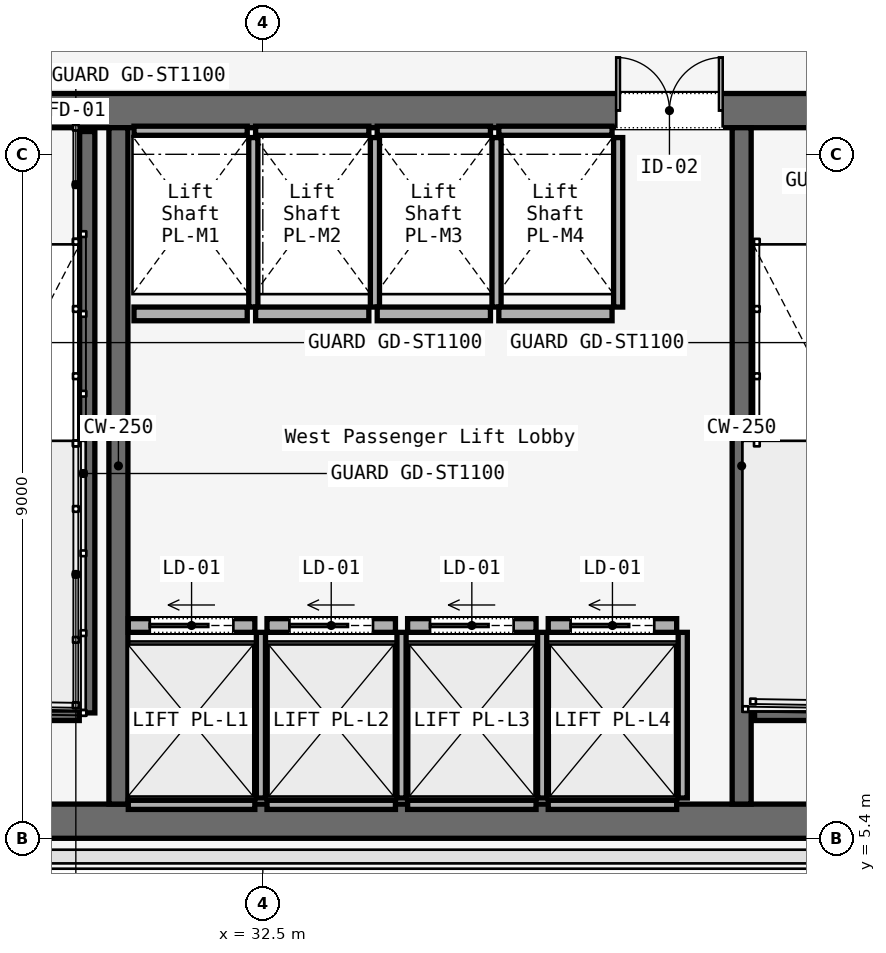
"""IFC4 building model, lengths in metres.
Left out: names, types, materials, properties, quantities, classifications, styles, units other than length and angle.
Written with IfcOpenShell. Run it as: python <this file> out.ifc"""

import sys

from ifc_helpers import new_model, si_unit, direction, frame, frame_2d, origin, place, context, subcontext, project, spatial, rectangle, extrude, element, fill, save


model = new_model("IFC4")
c1 = context("Model", 3, precision=1e-05, world=origin(), true_north=direction((0.0, 1.0)))
c2 = subcontext(c1, "Body", "Model", "MODEL_VIEW")
j1 = project(units=[si_unit("LENGTHUNIT", "METRE"), si_unit("PLANEANGLEUNIT", "RADIAN")], contexts=[c1])
p1 = place(None, origin())
s1 = spatial("IfcSite", under=j1, at=p1, CompositionType="ELEMENT")
p2 = place(p1, origin())
s2 = spatial("IfcBuilding", under=s1, at=p2, CompositionType="ELEMENT")
p3 = place(p2, frame((0.0, 0.0, 55.0)))
s3 = spatial("IfcBuildingStorey", under=s2, at=p3, CompositionType="ELEMENT", Elevation=55.0)
p4 = place(p3, frame((26.45, 14.975, 0.0), z_axis=(0.0, 0.0, 1.0), x_axis=(1.0, 0.0, 0.0)))
e1 = element("IfcWall", 1, at=p4, inside=s3, PredefinedType="SOLIDWALL", context=c2, shape_type="SweptSolid", body=[
    extrude(rectangle(XDim=31.1, YDim=0.45, at=frame_2d((15.55, 0.0))), origin(), (0.0, 0.0, 1.0), 3.58),
])
p5 = place(p4, frame((1.65, 0.0, 0.0)))
e2 = element("IfcOpeningElement", 2, at=p5, cuts=e1, PredefinedType="OPENING", context=c2, shape_type="SweptSolid", body=[
    extrude(rectangle(XDim=1.1, YDim=2.2, at=frame_2d((0.55, 1.1))), frame((0.0, 0.225, 0.0), z_axis=(0.0, -1.0, 0.0), x_axis=(1.0, 0.0, 0.0)), (0.0, 0.0, 1.0), 0.45),
])
p6 = place(p4, frame((13.65, 0.0, 0.0)))
e3 = element("IfcOpeningElement", 3, at=p6, cuts=e1, PredefinedType="OPENING", context=c2, shape_type="SweptSolid", body=[
    extrude(rectangle(XDim=1.1, YDim=2.2, at=frame_2d((0.55, 1.1))), frame((0.0, 0.225, 0.0), z_axis=(0.0, -1.0, 0.0), x_axis=(1.0, 0.0, 0.0)), (0.0, 0.0, 1.0), 0.45),
])
p7 = place(p4, frame((25.55, 0.0, 0.0)))
e4 = element("IfcOpeningElement", 4, at=p7, cuts=e1, PredefinedType="OPENING", context=c2, shape_type="SweptSolid", body=[
    extrude(rectangle(XDim=1.1, YDim=2.2, at=frame_2d((0.55, 1.1))), frame((0.0, 0.225, 0.0), z_axis=(0.0, -1.0, 0.0), x_axis=(1.0, 0.0, 0.0)), (0.0, 0.0, 1.0), 0.45),
])
p8 = place(p4, frame((10.7, 0.0, 0.0)))
e5 = element("IfcOpeningElement", 5, at=p8, cuts=e1, PredefinedType="OPENING", context=c2, shape_type="SweptSolid", body=[
    extrude(rectangle(XDim=1.4, YDim=2.2, at=frame_2d((0.7, 1.1))), frame((0.0, 0.225, 0.0), z_axis=(0.0, -1.0, 0.0), x_axis=(1.0, 0.0, 0.0)), (0.0, 0.0, 1.0), 0.45),
])
p9 = place(p4, frame((19.35, 0.0, 0.0)))
e6 = element("IfcOpeningElement", 6, at=p9, cuts=e1, PredefinedType="OPENING", context=c2, shape_type="SweptSolid", body=[
    extrude(rectangle(XDim=1.1, YDim=2.2, at=frame_2d((0.55, 1.1))), frame((0.0, 0.225, 0.0), z_axis=(0.0, -1.0, 0.0), x_axis=(1.0, 0.0, 0.0)), (0.0, 0.0, 1.0), 0.45),
])
p10 = place(p4, frame((21.4, 0.0, 0.0)))
e7 = element("IfcOpeningElement", 7, at=p10, cuts=e1, PredefinedType="OPENING", context=c2, shape_type="SweptSolid", body=[
    extrude(rectangle(XDim=0.9, YDim=2.1, at=frame_2d((0.45, 1.05))), frame((0.0, 0.225, 0.0), z_axis=(0.0, -1.0, 0.0), x_axis=(1.0, 0.0, 0.0)), (0.0, 0.0, 1.0), 0.45),
])
p11 = place(p4, frame((23.35, 0.0, 0.0)))
e8 = element("IfcOpeningElement", 8, at=p11, cuts=e1, PredefinedType="OPENING", context=c2, shape_type="SweptSolid", body=[
    extrude(rectangle(XDim=1.3, YDim=2.3, at=frame_2d((0.65, 1.15))), frame((0.0, 0.225, 0.0), z_axis=(0.0, -1.0, 0.0), x_axis=(1.0, 0.0, 0.0)), (0.0, 0.0, 1.0), 0.45),
])
p12 = place(p3, frame((26.45, 5.625, 0.0), z_axis=(0.0, 0.0, 1.0), x_axis=(1.0, 0.0, 0.0)))
e9 = element("IfcWall", 9, at=p12, inside=s3, PredefinedType="SOLIDWALL", context=c2, shape_type="SweptSolid", body=[
    extrude(rectangle(XDim=31.1, YDim=0.45, at=frame_2d((15.55, 0.0))), origin(), (0.0, 0.0, 1.0), 3.58),
])
for number, where, z_axis, x_axis in (
    (10, (30.6, 5.85, 0.0), (0.0, 0.0, 1.0), (0.0, 1.0, 0.0)),
    (11, (38.8, 5.85, 0.0), (0.0, 0.0, 1.0), (0.0, 1.0, 0.0)),
):
    element("IfcWall", number, at=place(p3, frame(where, z_axis=z_axis, x_axis=x_axis)), inside=s3, PredefinedType="SOLIDWALL", context=c2, shape_type="SweptSolid", body=[
        extrude(rectangle(XDim=8.9, YDim=0.25, at=frame_2d((4.45, 0.0))), origin(), (0.0, 0.0, 1.0), 3.58),
    ])
p13 = place(p3, frame((30.19, 14.7, 0.0), z_axis=(0.0, 0.0, 1.0), x_axis=(0.0, -1.0, 0.0)))
e12 = element("IfcWall", 12, at=p13, inside=s3, PredefinedType="SOLIDWALL", context=c2, shape_type="SweptSolid", body=[
    extrude(rectangle(XDim=7.65, YDim=0.2, at=frame_2d((3.825, 0.0))), origin(), (0.0, 0.0, 1.0), 3.8),
])
for number, where, z_axis, x_axis in (
    (13, (26.97, 7.05, 0.0), (0.0, 0.0, 1.0), (1.0, 0.0, 0.0)),
    (14, (38.97, 7.05, 0.0), (0.0, 0.0, 1.0), (1.0, 0.0, 0.0)),
):
    element("IfcWall", number, at=place(p3, frame(where, z_axis=z_axis, x_axis=x_axis)), inside=s3, PredefinedType="SOLIDWALL", context=c2, shape_type="SweptSolid", body=[
        extrude(rectangle(XDim=3.115, YDim=0.2, at=frame_2d((1.558, 0.0))), origin(), (0.0, 0.0, 1.0), 3.8),
    ])
p14 = place(p3, frame((30.73, 8.2, 0.0), z_axis=(0.0, 0.0, 1.0), x_axis=(1.0, 0.0, 0.0)))
e15 = element("IfcWall", 15, at=p14, inside=s3, PredefinedType="SOLIDWALL", context=c2, shape_type="SweptSolid", body=[
    extrude(rectangle(XDim=1.665, YDim=0.18, at=frame_2d((0.833, 0.0))), origin(), (0.0, 0.0, 1.0), 2.933),
])
p15 = place(p14, frame((0.282, 0.0, 0.0)))
e16 = element("IfcOpeningElement", 16, at=p15, cuts=e15, PredefinedType="OPENING", context=c2, shape_type="SweptSolid", body=[
    extrude(rectangle(XDim=1.1, YDim=2.2, at=frame_2d((0.55, 1.1))), frame((0.0, 0.09, 0.0), z_axis=(0.0, -1.0, 0.0), x_axis=(1.0, 0.0, 0.0)), (0.0, 0.0, 1.0), 0.18),
])
p16 = place(p3, frame((30.73, 5.84, 0.0), z_axis=(0.0, 0.0, 1.0), x_axis=(1.0, 0.0, 0.0)))
e17 = element("IfcWall", 17, at=p16, inside=s3, PredefinedType="SOLIDWALL", context=c2, shape_type="SweptSolid", body=[
    extrude(rectangle(XDim=1.665, YDim=0.12, at=frame_2d((0.833, 0.0))), origin(), (0.0, 0.0, 1.0), 2.933),
])
p17 = place(p3, frame((32.475, 5.93, 0.0), z_axis=(0.0, 0.0, 1.0), x_axis=(0.0, 1.0, 0.0)))
e18 = element("IfcWall", 18, at=p17, inside=s3, PredefinedType="SOLIDWALL", context=c2, shape_type="SweptSolid", body=[
    extrude(rectangle(XDim=2.18, YDim=0.12, at=frame_2d((1.09, 0.0))), origin(), (0.0, 0.0, 1.0), 2.933),
])
p18 = place(p3, frame((32.555, 8.2, 0.0), z_axis=(0.0, 0.0, 1.0), x_axis=(1.0, 0.0, 0.0)))
e19 = element("IfcWall", 19, at=p18, inside=s3, PredefinedType="SOLIDWALL", context=c2, shape_type="SweptSolid", body=[
    extrude(rectangle(XDim=1.69, YDim=0.18, at=frame_2d((0.845, 0.0))), origin(), (0.0, 0.0, 1.0), 2.933),
])
p19 = place(p18, frame((0.295, 0.0, 0.0)))
e20 = element("IfcOpeningElement", 20, at=p19, cuts=e19, PredefinedType="OPENING", context=c2, shape_type="SweptSolid", body=[
    extrude(rectangle(XDim=1.1, YDim=2.2, at=frame_2d((0.55, 1.1))), frame((0.0, 0.09, 0.0), z_axis=(0.0, -1.0, 0.0), x_axis=(1.0, 0.0, 0.0)), (0.0, 0.0, 1.0), 0.18),
])
p20 = place(p3, frame((32.555, 5.84, 0.0), z_axis=(0.0, 0.0, 1.0), x_axis=(1.0, 0.0, 0.0)))
e21 = element("IfcWall", 21, at=p20, inside=s3, PredefinedType="SOLIDWALL", context=c2, shape_type="SweptSolid", body=[
    extrude(rectangle(XDim=1.69, YDim=0.12, at=frame_2d((0.845, 0.0))), origin(), (0.0, 0.0, 1.0), 2.933),
])
p21 = place(p3, frame((34.325, 5.93, 0.0), z_axis=(0.0, 0.0, 1.0), x_axis=(0.0, 1.0, 0.0)))
e22 = element("IfcWall", 22, at=p21, inside=s3, PredefinedType="SOLIDWALL", context=c2, shape_type="SweptSolid", body=[
    extrude(rectangle(XDim=2.18, YDim=0.12, at=frame_2d((1.09, 0.0))), origin(), (0.0, 0.0, 1.0), 2.933),
])
p22 = place(p3, frame((34.405, 8.2, 0.0), z_axis=(0.0, 0.0, 1.0), x_axis=(1.0, 0.0, 0.0)))
e23 = element("IfcWall", 23, at=p22, inside=s3, PredefinedType="SOLIDWALL", context=c2, shape_type="SweptSolid", body=[
    extrude(rectangle(XDim=1.69, YDim=0.18, at=frame_2d((0.845, 0.0))), origin(), (0.0, 0.0, 1.0), 2.933),
])
p23 = place(p22, frame((0.295, 0.0, 0.0)))
e24 = element("IfcOpeningElement", 24, at=p23, cuts=e23, PredefinedType="OPENING", context=c2, shape_type="SweptSolid", body=[
    extrude(rectangle(XDim=1.1, YDim=2.2, at=frame_2d((0.55, 1.1))), frame((0.0, 0.09, 0.0), z_axis=(0.0, -1.0, 0.0), x_axis=(1.0, 0.0, 0.0)), (0.0, 0.0, 1.0), 0.18),
])
p24 = place(p3, frame((34.405, 5.84, 0.0), z_axis=(0.0, 0.0, 1.0), x_axis=(1.0, 0.0, 0.0)))
e25 = element("IfcWall", 25, at=p24, inside=s3, PredefinedType="SOLIDWALL", context=c2, shape_type="SweptSolid", body=[
    extrude(rectangle(XDim=1.69, YDim=0.12, at=frame_2d((0.845, 0.0))), origin(), (0.0, 0.0, 1.0), 2.933),
])
p25 = place(p3, frame((36.175, 5.93, 0.0), z_axis=(0.0, 0.0, 1.0), x_axis=(0.0, 1.0, 0.0)))
e26 = element("IfcWall", 26, at=p25, inside=s3, PredefinedType="SOLIDWALL", context=c2, shape_type="SweptSolid", body=[
    extrude(rectangle(XDim=2.18, YDim=0.12, at=frame_2d((1.09, 0.0))), origin(), (0.0, 0.0, 1.0), 2.933),
])
p26 = place(p3, frame((36.255, 8.2, 0.0), z_axis=(0.0, 0.0, 1.0), x_axis=(1.0, 0.0, 0.0)))
e27 = element("IfcWall", 27, at=p26, inside=s3, PredefinedType="SOLIDWALL", context=c2, shape_type="SweptSolid", body=[
    extrude(rectangle(XDim=1.69, YDim=0.18, at=frame_2d((0.845, 0.0))), origin(), (0.0, 0.0, 1.0), 2.933),
])
p27 = place(p26, frame((0.295, 0.0, 0.0)))
e28 = element("IfcOpeningElement", 28, at=p27, cuts=e27, PredefinedType="OPENING", context=c2, shape_type="SweptSolid", body=[
    extrude(rectangle(XDim=1.1, YDim=2.2, at=frame_2d((0.55, 1.1))), frame((0.0, 0.09, 0.0), z_axis=(0.0, -1.0, 0.0), x_axis=(1.0, 0.0, 0.0)), (0.0, 0.0, 1.0), 0.18),
])
p28 = place(p3, frame((36.255, 5.84, 0.0), z_axis=(0.0, 0.0, 1.0), x_axis=(1.0, 0.0, 0.0)))
e29 = element("IfcWall", 29, at=p28, inside=s3, PredefinedType="SOLIDWALL", context=c2, shape_type="SweptSolid", body=[
    extrude(rectangle(XDim=1.69, YDim=0.12, at=frame_2d((0.845, 0.0))), origin(), (0.0, 0.0, 1.0), 2.933),
])
p29 = place(p3, frame((38.025, 5.93, 0.0), z_axis=(0.0, 0.0, 1.0), x_axis=(0.0, 1.0, 0.0)))
e30 = element("IfcWall", 30, at=p29, inside=s3, PredefinedType="SOLIDWALL", context=c2, shape_type="SweptSolid", body=[
    extrude(rectangle(XDim=2.18, YDim=0.12, at=frame_2d((1.09, 0.0))), origin(), (0.0, 0.0, 1.0), 2.933),
])
p30 = place(p3, frame((30.805, 12.3, 0.0), z_axis=(0.0, 0.0, 1.0), x_axis=(1.0, 0.0, 0.0)))
e31 = element("IfcWall", 31, at=p30, inside=s3, PredefinedType="SOLIDWALL", context=c2, shape_type="SweptSolid", body=[
    extrude(rectangle(XDim=1.49, YDim=0.18, at=frame_2d((0.745, 0.0))), origin(), (0.0, 0.0, 1.0), 2.933),
])
p31 = place(p3, frame((30.805, 14.71, 0.0), z_axis=(0.0, 0.0, 1.0), x_axis=(1.0, 0.0, 0.0)))
e32 = element("IfcWall", 32, at=p31, inside=s3, PredefinedType="SOLIDWALL", context=c2, shape_type="SweptSolid", body=[
    extrude(rectangle(XDim=1.49, YDim=0.12, at=frame_2d((0.745, 0.0))), origin(), (0.0, 0.0, 1.0), 2.933),
])
p32 = place(p3, frame((32.375, 12.39, 0.0), z_axis=(0.0, 0.0, 1.0), x_axis=(0.0, 1.0, 0.0)))
e33 = element("IfcWall", 33, at=p32, inside=s3, PredefinedType="SOLIDWALL", context=c2, shape_type="SweptSolid", body=[
    extrude(rectangle(XDim=2.23, YDim=0.12, at=frame_2d((1.115, 0.0))), origin(), (0.0, 0.0, 1.0), 2.933),
])
p33 = place(p3, frame((32.405, 12.3, 0.0), z_axis=(0.0, 0.0, 1.0), x_axis=(1.0, 0.0, 0.0)))
e34 = element("IfcWall", 34, at=p33, inside=s3, PredefinedType="SOLIDWALL", context=c2, shape_type="SweptSolid", body=[
    extrude(rectangle(XDim=1.49, YDim=0.18, at=frame_2d((0.745, 0.0))), origin(), (0.0, 0.0, 1.0), 2.933),
])
p34 = place(p3, frame((32.405, 14.71, 0.0), z_axis=(0.0, 0.0, 1.0), x_axis=(1.0, 0.0, 0.0)))
e35 = element("IfcWall", 35, at=p34, inside=s3, PredefinedType="SOLIDWALL", context=c2, shape_type="SweptSolid", body=[
    extrude(rectangle(XDim=1.49, YDim=0.12, at=frame_2d((0.745, 0.0))), origin(), (0.0, 0.0, 1.0), 2.933),
])
p35 = place(p3, frame((33.975, 12.39, 0.0), z_axis=(0.0, 0.0, 1.0), x_axis=(0.0, 1.0, 0.0)))
e36 = element("IfcWall", 36, at=p35, inside=s3, PredefinedType="SOLIDWALL", context=c2, shape_type="SweptSolid", body=[
    extrude(rectangle(XDim=2.23, YDim=0.12, at=frame_2d((1.115, 0.0))), origin(), (0.0, 0.0, 1.0), 2.933),
])
p36 = place(p3, frame((34.005, 12.3, 0.0), z_axis=(0.0, 0.0, 1.0), x_axis=(1.0, 0.0, 0.0)))
e37 = element("IfcWall", 37, at=p36, inside=s3, PredefinedType="SOLIDWALL", context=c2, shape_type="SweptSolid", body=[
    extrude(rectangle(XDim=1.49, YDim=0.18, at=frame_2d((0.745, 0.0))), origin(), (0.0, 0.0, 1.0), 2.933),
])
p37 = place(p3, frame((34.005, 14.71, 0.0), z_axis=(0.0, 0.0, 1.0), x_axis=(1.0, 0.0, 0.0)))
e38 = element("IfcWall", 38, at=p37, inside=s3, PredefinedType="SOLIDWALL", context=c2, shape_type="SweptSolid", body=[
    extrude(rectangle(XDim=1.49, YDim=0.12, at=frame_2d((0.745, 0.0))), origin(), (0.0, 0.0, 1.0), 2.933),
])
p38 = place(p3, frame((35.575, 12.39, 0.0), z_axis=(0.0, 0.0, 1.0), x_axis=(0.0, 1.0, 0.0)))
e39 = element("IfcWall", 39, at=p38, inside=s3, PredefinedType="SOLIDWALL", context=c2, shape_type="SweptSolid", body=[
    extrude(rectangle(XDim=2.23, YDim=0.12, at=frame_2d((1.115, 0.0))), origin(), (0.0, 0.0, 1.0), 2.933),
])
p39 = place(p3, frame((35.605, 12.3, 0.0), z_axis=(0.0, 0.0, 1.0), x_axis=(1.0, 0.0, 0.0)))
e40 = element("IfcWall", 40, at=p39, inside=s3, PredefinedType="SOLIDWALL", context=c2, shape_type="SweptSolid", body=[
    extrude(rectangle(XDim=1.49, YDim=0.18, at=frame_2d((0.745, 0.0))), origin(), (0.0, 0.0, 1.0), 2.933),
])
p40 = place(p3, frame((35.605, 14.71, 0.0), z_axis=(0.0, 0.0, 1.0), x_axis=(1.0, 0.0, 0.0)))
e41 = element("IfcWall", 41, at=p40, inside=s3, PredefinedType="SOLIDWALL", context=c2, shape_type="SweptSolid", body=[
    extrude(rectangle(XDim=1.49, YDim=0.12, at=frame_2d((0.745, 0.0))), origin(), (0.0, 0.0, 1.0), 2.933),
])
p41 = place(p3, frame((37.175, 12.39, 0.0), z_axis=(0.0, 0.0, 1.0), x_axis=(0.0, 1.0, 0.0)))
e42 = element("IfcWall", 42, at=p41, inside=s3, PredefinedType="SOLIDWALL", context=c2, shape_type="SweptSolid", body=[
    extrude(rectangle(XDim=2.23, YDim=0.12, at=frame_2d((1.115, 0.0))), origin(), (0.0, 0.0, 1.0), 2.933),
])
p42 = place(p8, origin())
e43 = element("IfcDoor", 43, at=p42, inside=s3, OperationType="DOUBLE_DOOR_SINGLE_SWING", PredefinedType="DOOR", context=c2, shape_type="SweptSolid", body=[
    extrude(rectangle(XDim=1.4, YDim=2.2, at=frame_2d((0.7, 1.1))), frame((0.0, 0.025, 0.0), z_axis=(0.0, -1.0, 0.0), x_axis=(1.0, 0.0, 0.0)), (0.0, 0.0, 1.0), 0.05),
])
fill(e5, e43)
p43 = place(p15, origin())
e44 = element("IfcDoor", 44, at=p43, inside=s3, OperationType="SLIDING_TO_LEFT", PredefinedType="DOOR", context=c2, shape_type="SweptSolid", body=[
    extrude(rectangle(XDim=1.1, YDim=2.2, at=frame_2d((0.55, 1.1))), frame((0.0, 0.025, 0.0), z_axis=(0.0, -1.0, 0.0), x_axis=(1.0, 0.0, 0.0)), (0.0, 0.0, 1.0), 0.05),
])
fill(e16, e44)
p44 = place(p19, origin())
e45 = element("IfcDoor", 45, at=p44, inside=s3, OperationType="SLIDING_TO_LEFT", PredefinedType="DOOR", context=c2, shape_type="SweptSolid", body=[
    extrude(rectangle(XDim=1.1, YDim=2.2, at=frame_2d((0.55, 1.1))), frame((0.0, 0.025, 0.0), z_axis=(0.0, -1.0, 0.0), x_axis=(1.0, 0.0, 0.0)), (0.0, 0.0, 1.0), 0.05),
])
fill(e20, e45)
p45 = place(p23, origin())
e46 = element("IfcDoor", 46, at=p45, inside=s3, OperationType="SLIDING_TO_LEFT", PredefinedType="DOOR", context=c2, shape_type="SweptSolid", body=[
    extrude(rectangle(XDim=1.1, YDim=2.2, at=frame_2d((0.55, 1.1))), frame((0.0, 0.025, 0.0), z_axis=(0.0, -1.0, 0.0), x_axis=(1.0, 0.0, 0.0)), (0.0, 0.0, 1.0), 0.05),
])
fill(e24, e46)
p46 = place(p27, origin())
e47 = element("IfcDoor", 47, at=p46, inside=s3, OperationType="SLIDING_TO_LEFT", PredefinedType="DOOR", context=c2, shape_type="SweptSolid", body=[
    extrude(rectangle(XDim=1.1, YDim=2.2, at=frame_2d((0.55, 1.1))), frame((0.0, 0.025, 0.0), z_axis=(0.0, -1.0, 0.0), x_axis=(1.0, 0.0, 0.0)), (0.0, 0.0, 1.0), 0.05),
])
fill(e28, e47)
save(model, sys.argv[1])
